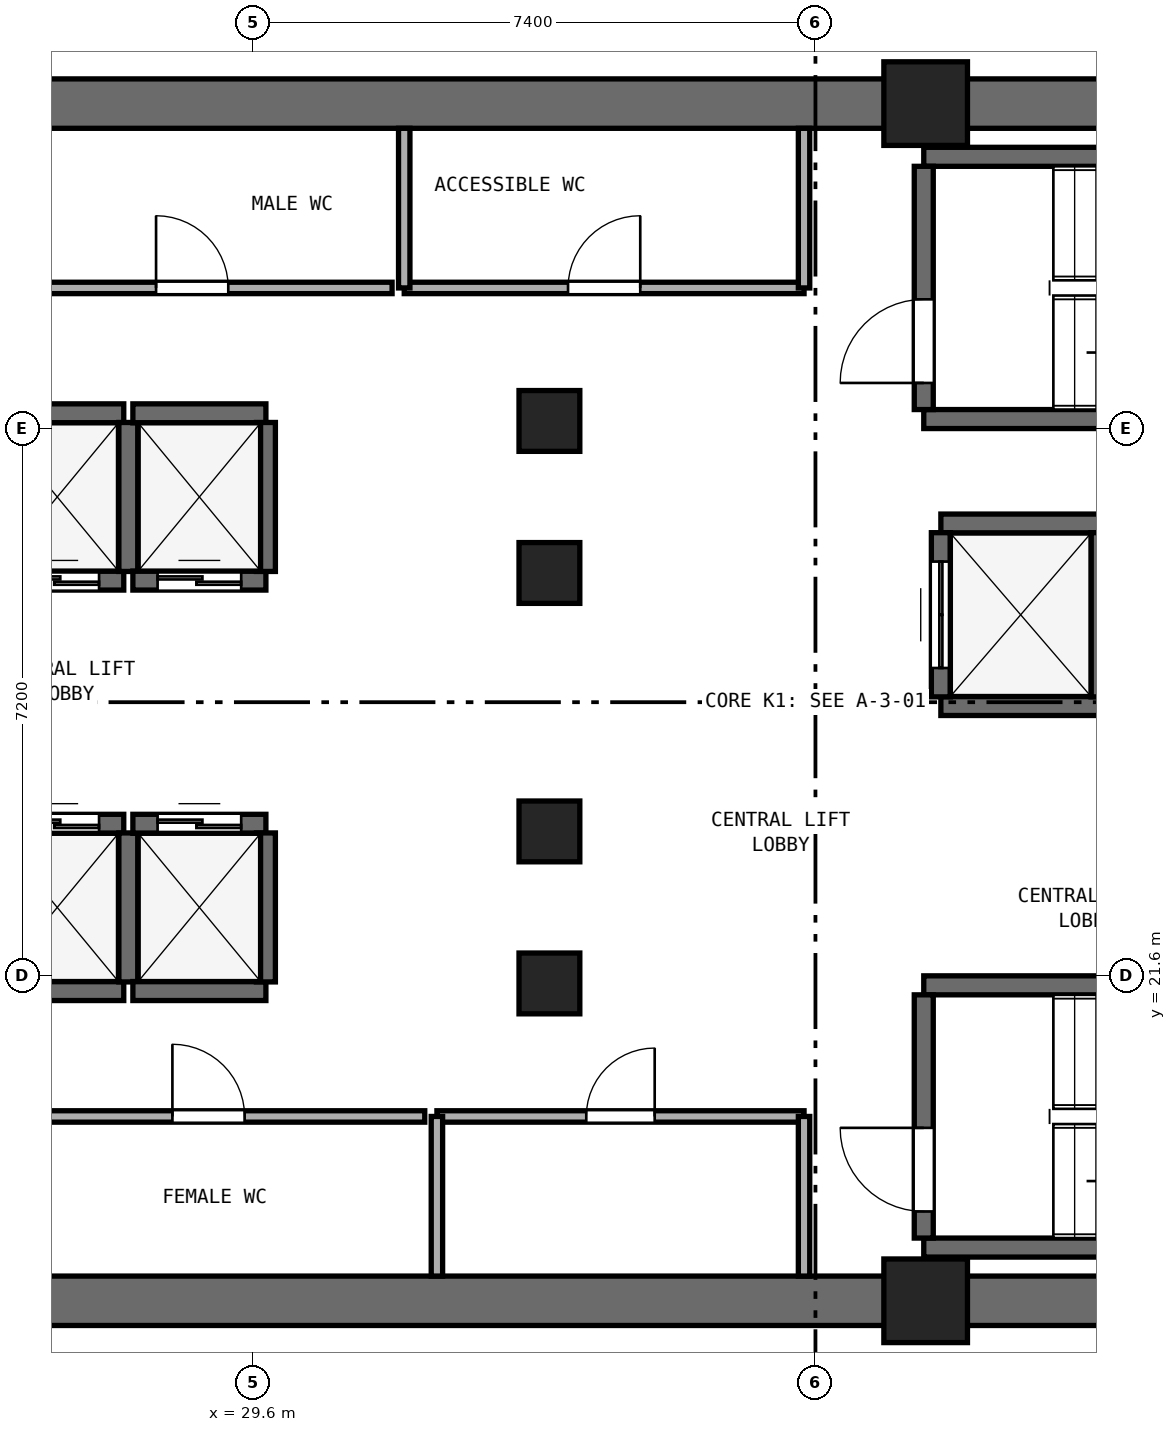
"""IFC4 building model, lengths in metres.
Left out: names, types, materials, properties, quantities, classifications, styles, units other than length and angle.
Written with IfcOpenShell. Run it as: python <this file> out.ifc"""

import sys

from ifc_helpers import new_model, si_unit, direction, frame, frame_2d, origin, origin_2d, place, context, subcontext, project, spatial, rectangle, extrude, element, fill, save


model = new_model("IFC4")
c1 = context("Model", 3, precision=1e-05, world=origin(), true_north=direction((0.0, 1.0)))
c2 = subcontext(c1, "Body", "Model", "MODEL_VIEW")
j1 = project(units=[si_unit("LENGTHUNIT", "METRE"), si_unit("PLANEANGLEUNIT", "RADIAN")], contexts=[c1])
p1 = place(None, origin())
s1 = spatial("IfcSite", under=j1, at=p1, CompositionType="ELEMENT")
p2 = place(p1, origin())
s2 = spatial("IfcBuilding", under=s1, at=p2, CompositionType="ELEMENT")
p3 = place(p2, frame((0.0, 0.0, -9.6)))
s3 = spatial("IfcBuildingStorey", under=s2, at=p3, CompositionType="ELEMENT", Elevation=-9.6)
for number, where, z_axis, x_axis in (
    (1, (25.4, 17.325, 0.0), (0.0, 0.0, 1.0), (1.0, 0.0, 0.0)),
    (2, (25.4, 33.075, 0.0), (0.0, 0.0, 1.0), (1.0, 0.0, 0.0)),
):
    element("IfcWall", number, at=place(p3, frame(where, z_axis=z_axis, x_axis=x_axis)), inside=s3, PredefinedType="SHEAR", context=c2, shape_type="SweptSolid", body=[
        extrude(rectangle(XDim=23.2, YDim=0.65, at=frame_2d((11.6, 0.0))), origin(), (0.0, 0.0, 1.0), 4.45),
    ])
for number, where, z_axis, x_axis in (
    (3, (38.45, 17.325, 0.0), (0.0, 0.0, 1.0), (1.0, 0.0, 0.0)),
    (4, (38.45, 33.075, 0.0), (0.0, 0.0, 1.0), (1.0, 0.0, 0.0)),
):
    element("IfcColumn", number, at=place(p3, frame(where, z_axis=z_axis, x_axis=x_axis)), inside=s3, PredefinedType="PILASTER", context=c2, shape_type="SweptSolid", body=[
        extrude(rectangle(XDim=1.1, YDim=1.1, at=origin_2d()), origin(), (0.0, 0.0, 1.0), 4.8),
    ])
for number, where, z_axis, x_axis in (
    (5, (33.5, 21.5, 0.0), (0.0, 0.0, 1.0), (1.0, 0.0, 0.0)),
    (6, (33.5, 23.5, 0.0), (0.0, 0.0, 1.0), (1.0, 0.0, 0.0)),
    (7, (33.5, 26.9, 0.0), (0.0, 0.0, 1.0), (1.0, 0.0, 0.0)),
    (8, (33.5, 28.9, 0.0), (0.0, 0.0, 1.0), (1.0, 0.0, 0.0)),
):
    element("IfcColumn", number, at=place(p3, frame(where, z_axis=z_axis, x_axis=x_axis)), inside=s3, PredefinedType="COLUMN", context=c2, shape_type="SweptSolid", body=[
        extrude(rectangle(XDim=0.8, YDim=0.8, at=origin_2d()), origin(), (0.0, 0.0, 1.0), 4.8),
    ])
for number, where, z_axis, x_axis in (
    (9, (38.425, 28.925, 0.0), (0.0, 0.0, 1.0), (1.0, 0.0, 0.0)),
    (10, (38.425, 32.375, 0.0), (0.0, 0.0, 1.0), (1.0, 0.0, 0.0)),
):
    element("IfcWall", number, at=place(p3, frame(where, z_axis=z_axis, x_axis=x_axis)), inside=s3, PredefinedType="SHEAR", context=c2, shape_type="SweptSolid", body=[
        extrude(rectangle(XDim=7.3, YDim=0.25, at=frame_2d((3.65, 0.0))), origin(), (0.0, 0.0, 1.0), 4.45),
    ])
p4 = place(p3, frame((38.425, 29.05, 0.0), z_axis=(0.0, 0.0, 1.0), x_axis=(0.0, 1.0, 0.0)))
e11 = element("IfcWall", 11, at=p4, inside=s3, PredefinedType="SHEAR", context=c2, shape_type="SweptSolid", body=[
    extrude(rectangle(XDim=3.2, YDim=0.25, at=frame_2d((1.6, 0.0))), origin(), (0.0, 0.0, 1.0), 4.45),
])
p5 = place(p4, frame((0.35, 0.0, 0.0)))
e12 = element("IfcOpeningElement", 12, at=p5, cuts=e11, PredefinedType="OPENING", context=c2, shape_type="SweptSolid", body=[
    extrude(rectangle(XDim=1.1, YDim=2.15, at=frame_2d((0.55, 1.075))), frame((0.0, 0.135, 0.0), z_axis=(0.0, -1.0, 0.0), x_axis=(1.0, 0.0, 0.0)), (0.0, 0.0, 1.0), 0.27),
])
for number, where, z_axis, x_axis in (
    (13, (38.425, 18.025, 0.0), (0.0, 0.0, 1.0), (1.0, 0.0, 0.0)),
    (14, (38.425, 21.475, 0.0), (0.0, 0.0, 1.0), (1.0, 0.0, 0.0)),
):
    element("IfcWall", number, at=place(p3, frame(where, z_axis=z_axis, x_axis=x_axis)), inside=s3, PredefinedType="SHEAR", context=c2, shape_type="SweptSolid", body=[
        extrude(rectangle(XDim=7.3, YDim=0.25, at=frame_2d((3.65, 0.0))), origin(), (0.0, 0.0, 1.0), 4.45),
    ])
p6 = place(p3, frame((38.425, 18.15, 0.0), z_axis=(0.0, 0.0, 1.0), x_axis=(0.0, 1.0, 0.0)))
e15 = element("IfcWall", 15, at=p6, inside=s3, PredefinedType="SHEAR", context=c2, shape_type="SweptSolid", body=[
    extrude(rectangle(XDim=3.2, YDim=0.25, at=frame_2d((1.6, 0.0))), origin(), (0.0, 0.0, 1.0), 4.45),
])
p7 = place(p6, frame((0.35, 0.0, 0.0)))
e16 = element("IfcOpeningElement", 16, at=p7, cuts=e15, PredefinedType="OPENING", context=c2, shape_type="SweptSolid", body=[
    extrude(rectangle(XDim=1.1, YDim=2.15, at=frame_2d((0.55, 1.075))), frame((0.0, 0.135, 0.0), z_axis=(0.0, -1.0, 0.0), x_axis=(1.0, 0.0, 0.0)), (0.0, 0.0, 1.0), 0.27),
])
p8 = place(p3, frame((26.15, 26.8, 0.0), z_axis=(0.0, 0.0, 1.0), x_axis=(1.0, 0.0, 0.0)))
e17 = element("IfcWall", 17, at=p8, inside=s3, PredefinedType="SHEAR", context=c2, shape_type="SweptSolid", body=[
    extrude(rectangle(XDim=1.75, YDim=0.25, at=frame_2d((0.875, 0.0))), origin(), (0.0, 0.0, 1.0), 4.45),
])
p9 = place(p8, frame((0.325, 0.0, 0.0)))
e18 = element("IfcOpeningElement", 18, at=p9, cuts=e17, PredefinedType="OPENING", context=c2, shape_type="SweptSolid", body=[
    extrude(rectangle(XDim=1.1, YDim=2.15, at=frame_2d((0.55, 1.075))), frame((0.0, 0.135, 0.0), z_axis=(0.0, -1.0, 0.0), x_axis=(1.0, 0.0, 0.0)), (0.0, 0.0, 1.0), 0.27),
])
p10 = place(p3, frame((26.15, 29.0, 0.0), z_axis=(0.0, 0.0, 1.0), x_axis=(1.0, 0.0, 0.0)))
e19 = element("IfcWall", 19, at=p10, inside=s3, PredefinedType="SHEAR", context=c2, shape_type="SweptSolid", body=[
    extrude(rectangle(XDim=1.75, YDim=0.25, at=frame_2d((0.875, 0.0))), origin(), (0.0, 0.0, 1.0), 4.45),
])
p11 = place(p3, frame((27.96, 26.92, 0.0), z_axis=(0.0, 0.0, 1.0), x_axis=(0.0, 1.0, 0.0)))
e20 = element("IfcWall", 20, at=p11, inside=s3, PredefinedType="SHEAR", context=c2, shape_type="SweptSolid", body=[
    extrude(rectangle(XDim=1.96, YDim=0.25, at=frame_2d((0.98, 0.0))), origin(), (0.0, 0.0, 1.0), 4.45),
])
p12 = place(p3, frame((28.02, 26.8, 0.0), z_axis=(0.0, 0.0, 1.0), x_axis=(1.0, 0.0, 0.0)))
e21 = element("IfcWall", 21, at=p12, inside=s3, PredefinedType="SHEAR", context=c2, shape_type="SweptSolid", body=[
    extrude(rectangle(XDim=1.75, YDim=0.25, at=frame_2d((0.875, 0.0))), origin(), (0.0, 0.0, 1.0), 4.45),
])
p13 = place(p12, frame((0.325, 0.0, 0.0)))
e22 = element("IfcOpeningElement", 22, at=p13, cuts=e21, PredefinedType="OPENING", context=c2, shape_type="SweptSolid", body=[
    extrude(rectangle(XDim=1.1, YDim=2.15, at=frame_2d((0.55, 1.075))), frame((0.0, 0.135, 0.0), z_axis=(0.0, -1.0, 0.0), x_axis=(1.0, 0.0, 0.0)), (0.0, 0.0, 1.0), 0.27),
])
p14 = place(p3, frame((28.02, 29.0, 0.0), z_axis=(0.0, 0.0, 1.0), x_axis=(1.0, 0.0, 0.0)))
e23 = element("IfcWall", 23, at=p14, inside=s3, PredefinedType="SHEAR", context=c2, shape_type="SweptSolid", body=[
    extrude(rectangle(XDim=1.75, YDim=0.25, at=frame_2d((0.875, 0.0))), origin(), (0.0, 0.0, 1.0), 4.45),
])
p15 = place(p3, frame((29.77, 26.92, 0.0), z_axis=(0.0, 0.0, 1.0), x_axis=(0.0, 1.0, 0.0)))
e24 = element("IfcWall", 24, at=p15, inside=s3, PredefinedType="SHEAR", context=c2, shape_type="SweptSolid", body=[
    extrude(rectangle(XDim=1.96, YDim=0.25, at=frame_2d((0.98, 0.0))), origin(), (0.0, 0.0, 1.0), 4.45),
])
p16 = place(p3, frame((26.15, 21.4, 0.0), z_axis=(0.0, 0.0, 1.0), x_axis=(1.0, 0.0, 0.0)))
e25 = element("IfcWall", 25, at=p16, inside=s3, PredefinedType="SHEAR", context=c2, shape_type="SweptSolid", body=[
    extrude(rectangle(XDim=1.75, YDim=0.25, at=frame_2d((0.875, 0.0))), origin(), (0.0, 0.0, 1.0), 4.45),
])
p17 = place(p3, frame((26.15, 23.6, 0.0), z_axis=(0.0, 0.0, 1.0), x_axis=(1.0, 0.0, 0.0)))
e26 = element("IfcWall", 26, at=p17, inside=s3, PredefinedType="SHEAR", context=c2, shape_type="SweptSolid", body=[
    extrude(rectangle(XDim=1.75, YDim=0.25, at=frame_2d((0.875, 0.0))), origin(), (0.0, 0.0, 1.0), 4.45),
])
p18 = place(p17, frame((0.325, 0.0, 0.0)))
e27 = element("IfcOpeningElement", 27, at=p18, cuts=e26, PredefinedType="OPENING", context=c2, shape_type="SweptSolid", body=[
    extrude(rectangle(XDim=1.1, YDim=2.15, at=frame_2d((0.55, 1.075))), frame((0.0, 0.135, 0.0), z_axis=(0.0, -1.0, 0.0), x_axis=(1.0, 0.0, 0.0)), (0.0, 0.0, 1.0), 0.27),
])
p19 = place(p3, frame((27.96, 21.52, 0.0), z_axis=(0.0, 0.0, 1.0), x_axis=(0.0, 1.0, 0.0)))
e28 = element("IfcWall", 28, at=p19, inside=s3, PredefinedType="SHEAR", context=c2, shape_type="SweptSolid", body=[
    extrude(rectangle(XDim=1.96, YDim=0.25, at=frame_2d((0.98, 0.0))), origin(), (0.0, 0.0, 1.0), 4.45),
])
p20 = place(p3, frame((28.02, 21.4, 0.0), z_axis=(0.0, 0.0, 1.0), x_axis=(1.0, 0.0, 0.0)))
e29 = element("IfcWall", 29, at=p20, inside=s3, PredefinedType="SHEAR", context=c2, shape_type="SweptSolid", body=[
    extrude(rectangle(XDim=1.75, YDim=0.25, at=frame_2d((0.875, 0.0))), origin(), (0.0, 0.0, 1.0), 4.45),
])
p21 = place(p3, frame((28.02, 23.6, 0.0), z_axis=(0.0, 0.0, 1.0), x_axis=(1.0, 0.0, 0.0)))
e30 = element("IfcWall", 30, at=p21, inside=s3, PredefinedType="SHEAR", context=c2, shape_type="SweptSolid", body=[
    extrude(rectangle(XDim=1.75, YDim=0.25, at=frame_2d((0.875, 0.0))), origin(), (0.0, 0.0, 1.0), 4.45),
])
p22 = place(p21, frame((0.325, 0.0, 0.0)))
e31 = element("IfcOpeningElement", 31, at=p22, cuts=e30, PredefinedType="OPENING", context=c2, shape_type="SweptSolid", body=[
    extrude(rectangle(XDim=1.1, YDim=2.15, at=frame_2d((0.55, 1.075))), frame((0.0, 0.135, 0.0), z_axis=(0.0, -1.0, 0.0), x_axis=(1.0, 0.0, 0.0)), (0.0, 0.0, 1.0), 0.27),
])
p23 = place(p3, frame((29.77, 21.52, 0.0), z_axis=(0.0, 0.0, 1.0), x_axis=(0.0, 1.0, 0.0)))
e32 = element("IfcWall", 32, at=p23, inside=s3, PredefinedType="SHEAR", context=c2, shape_type="SweptSolid", body=[
    extrude(rectangle(XDim=1.96, YDim=0.25, at=frame_2d((0.98, 0.0))), origin(), (0.0, 0.0, 1.0), 4.45),
])
for number, where, z_axis, x_axis in (
    (33, (38.65, 25.15, 0.0), (0.0, 0.0, 1.0), (1.0, 0.0, 0.0)),
    (34, (38.65, 27.55, 0.0), (0.0, 0.0, 1.0), (1.0, 0.0, 0.0)),
):
    element("IfcWall", number, at=place(p3, frame(where, z_axis=z_axis, x_axis=x_axis)), inside=s3, PredefinedType="SHEAR", context=c2, shape_type="SweptSolid", body=[
        extrude(rectangle(XDim=2.1, YDim=0.25, at=frame_2d((1.05, 0.0))), origin(), (0.0, 0.0, 1.0), 4.45),
    ])
p24 = place(p3, frame((38.65, 25.27, 0.0), z_axis=(0.0, 0.0, 1.0), x_axis=(0.0, 1.0, 0.0)))
e35 = element("IfcWall", 35, at=p24, inside=s3, PredefinedType="SHEAR", context=c2, shape_type="SweptSolid", body=[
    extrude(rectangle(XDim=2.16, YDim=0.25, at=frame_2d((1.08, 0.0))), origin(), (0.0, 0.0, 1.0), 4.45),
])
p25 = place(p24, frame((0.38, 0.0, 0.0)))
e36 = element("IfcOpeningElement", 36, at=p25, cuts=e35, PredefinedType="OPENING", context=c2, shape_type="SweptSolid", body=[
    extrude(rectangle(XDim=1.4, YDim=2.2, at=frame_2d((0.7, 1.1))), frame((0.0, 0.135, 0.0), z_axis=(0.0, -1.0, 0.0), x_axis=(1.0, 0.0, 0.0)), (0.0, 0.0, 1.0), 0.27),
])
p26 = place(p3, frame((40.75, 25.27, 0.0), z_axis=(0.0, 0.0, 1.0), x_axis=(0.0, 1.0, 0.0)))
e37 = element("IfcWall", 37, at=p26, inside=s3, PredefinedType="SHEAR", context=c2, shape_type="SweptSolid", body=[
    extrude(rectangle(XDim=2.16, YDim=0.25, at=frame_2d((1.08, 0.0))), origin(), (0.0, 0.0, 1.0), 4.45),
])
p27 = place(p3, frame((26.17, 30.65, 0.0), z_axis=(0.0, 0.0, 1.0), x_axis=(1.0, 0.0, 0.0)))
e38 = element("IfcWall", 38, at=p27, inside=s3, PredefinedType="PARTITIONING", context=c2, shape_type="SweptSolid", body=[
    extrude(rectangle(XDim=5.26, YDim=0.15, at=frame_2d((2.63, 0.0))), origin(), (0.0, 0.0, 1.0), 4.45),
])
p28 = place(p27, frame((2.155, 0.0, 0.0)))
e39 = element("IfcOpeningElement", 39, at=p28, cuts=e38, PredefinedType="OPENING", context=c2, shape_type="SweptSolid", body=[
    extrude(rectangle(XDim=0.95, YDim=2.1, at=frame_2d((0.475, 1.05))), frame((0.0, 0.085, 0.0), z_axis=(0.0, -1.0, 0.0), x_axis=(1.0, 0.0, 0.0)), (0.0, 0.0, 1.0), 0.17),
])
p29 = place(p3, frame((31.59, 30.65, 0.0), z_axis=(0.0, 0.0, 1.0), x_axis=(1.0, 0.0, 0.0)))
e40 = element("IfcWall", 40, at=p29, inside=s3, PredefinedType="PARTITIONING", context=c2, shape_type="SweptSolid", body=[
    extrude(rectangle(XDim=5.26, YDim=0.15, at=frame_2d((2.63, 0.0))), origin(), (0.0, 0.0, 1.0), 4.45),
])
p30 = place(p29, frame((2.155, 0.0, 0.0)))
e41 = element("IfcOpeningElement", 41, at=p30, cuts=e40, PredefinedType="OPENING", context=c2, shape_type="SweptSolid", body=[
    extrude(rectangle(XDim=0.95, YDim=2.1, at=frame_2d((0.475, 1.05))), frame((0.0, 0.085, 0.0), z_axis=(0.0, -1.0, 0.0), x_axis=(1.0, 0.0, 0.0)), (0.0, 0.0, 1.0), 0.17),
])
for number, where, z_axis, x_axis in (
    (42, (31.59, 30.65, 0.0), (0.0, 0.0, 1.0), (0.0, 1.0, 0.0)),
    (43, (36.85, 30.65, 0.0), (0.0, 0.0, 1.0), (0.0, 1.0, 0.0)),
):
    element("IfcWall", number, at=place(p3, frame(where, z_axis=z_axis, x_axis=x_axis)), inside=s3, PredefinedType="PARTITIONING", context=c2, shape_type="SweptSolid", body=[
        extrude(rectangle(XDim=2.1, YDim=0.15, at=frame_2d((1.05, 0.0))), origin(), (0.0, 0.0, 1.0), 4.45),
    ])
p31 = place(p3, frame((26.17, 19.75, 0.0), z_axis=(0.0, 0.0, 1.0), x_axis=(1.0, 0.0, 0.0)))
e44 = element("IfcWall", 44, at=p31, inside=s3, PredefinedType="PARTITIONING", context=c2, shape_type="SweptSolid", body=[
    extrude(rectangle(XDim=5.69, YDim=0.15, at=frame_2d((2.845, 0.0))), origin(), (0.0, 0.0, 1.0), 4.45),
])
p32 = place(p31, frame((2.37, 0.0, 0.0)))
e45 = element("IfcOpeningElement", 45, at=p32, cuts=e44, PredefinedType="OPENING", context=c2, shape_type="SweptSolid", body=[
    extrude(rectangle(XDim=0.95, YDim=2.1, at=frame_2d((0.475, 1.05))), frame((0.0, 0.085, 0.0), z_axis=(0.0, -1.0, 0.0), x_axis=(1.0, 0.0, 0.0)), (0.0, 0.0, 1.0), 0.17),
])
p33 = place(p3, frame((32.02, 19.75, 0.0), z_axis=(0.0, 0.0, 1.0), x_axis=(1.0, 0.0, 0.0)))
e46 = element("IfcWall", 46, at=p33, inside=s3, PredefinedType="PARTITIONING", context=c2, shape_type="SweptSolid", body=[
    extrude(rectangle(XDim=4.83, YDim=0.15, at=frame_2d((2.415, 0.0))), origin(), (0.0, 0.0, 1.0), 4.45),
])
p34 = place(p33, frame((1.965, 0.0, 0.0)))
e47 = element("IfcOpeningElement", 47, at=p34, cuts=e46, PredefinedType="OPENING", context=c2, shape_type="SweptSolid", body=[
    extrude(rectangle(XDim=0.9, YDim=2.1, at=frame_2d((0.45, 1.05))), frame((0.0, 0.085, 0.0), z_axis=(0.0, -1.0, 0.0), x_axis=(1.0, 0.0, 0.0)), (0.0, 0.0, 1.0), 0.17),
])
for number, where, z_axis, x_axis in (
    (48, (32.02, 17.65, 0.0), (0.0, 0.0, 1.0), (0.0, 1.0, 0.0)),
    (49, (36.85, 17.65, 0.0), (0.0, 0.0, 1.0), (0.0, 1.0, 0.0)),
):
    element("IfcWall", number, at=place(p3, frame(where, z_axis=z_axis, x_axis=x_axis)), inside=s3, PredefinedType="PARTITIONING", context=c2, shape_type="SweptSolid", body=[
        extrude(rectangle(XDim=2.1, YDim=0.15, at=frame_2d((1.05, 0.0))), origin(), (0.0, 0.0, 1.0), 4.45),
    ])
p35 = place(p5, origin())
e50 = element("IfcDoor", 50, at=p35, inside=s3, OperationType="SINGLE_SWING_LEFT", PredefinedType="DOOR", context=c2, shape_type="SweptSolid", body=[
    extrude(rectangle(XDim=1.1, YDim=2.15, at=frame_2d((0.55, 1.075))), frame((0.0, 0.025, 0.0), z_axis=(0.0, -1.0, 0.0), x_axis=(1.0, 0.0, 0.0)), (0.0, 0.0, 1.0), 0.05),
])
fill(e12, e50)
p36 = place(p7, origin())
e51 = element("IfcDoor", 51, at=p36, inside=s3, OperationType="SINGLE_SWING_RIGHT", PredefinedType="DOOR", context=c2, shape_type="SweptSolid", body=[
    extrude(rectangle(XDim=1.1, YDim=2.15, at=frame_2d((0.55, 1.075))), frame((0.0, 0.025, 0.0), z_axis=(0.0, -1.0, 0.0), x_axis=(1.0, 0.0, 0.0)), (0.0, 0.0, 1.0), 0.05),
])
fill(e16, e51)
p37 = place(p9, origin())
e52 = element("IfcDoor", 52, at=p37, inside=s3, OperationType="DOUBLE_DOOR_SLIDING", PredefinedType="DOOR", context=c2, shape_type="SweptSolid", body=[
    extrude(rectangle(XDim=1.1, YDim=2.15, at=frame_2d((0.55, 1.075))), frame((0.0, 0.025, 0.0), z_axis=(0.0, -1.0, 0.0), x_axis=(1.0, 0.0, 0.0)), (0.0, 0.0, 1.0), 0.05),
])
fill(e18, e52)
p38 = place(p13, origin())
e53 = element("IfcDoor", 53, at=p38, inside=s3, OperationType="DOUBLE_DOOR_SLIDING", PredefinedType="DOOR", context=c2, shape_type="SweptSolid", body=[
    extrude(rectangle(XDim=1.1, YDim=2.15, at=frame_2d((0.55, 1.075))), frame((0.0, 0.025, 0.0), z_axis=(0.0, -1.0, 0.0), x_axis=(1.0, 0.0, 0.0)), (0.0, 0.0, 1.0), 0.05),
])
fill(e22, e53)
p39 = place(p18, origin())
e54 = element("IfcDoor", 54, at=p39, inside=s3, OperationType="DOUBLE_DOOR_SLIDING", PredefinedType="DOOR", context=c2, shape_type="SweptSolid", body=[
    extrude(rectangle(XDim=1.1, YDim=2.15, at=frame_2d((0.55, 1.075))), frame((0.0, 0.025, 0.0), z_axis=(0.0, -1.0, 0.0), x_axis=(1.0, 0.0, 0.0)), (0.0, 0.0, 1.0), 0.05),
])
fill(e27, e54)
p40 = place(p22, origin())
e55 = element("IfcDoor", 55, at=p40, inside=s3, OperationType="DOUBLE_DOOR_SLIDING", PredefinedType="DOOR", context=c2, shape_type="SweptSolid", body=[
    extrude(rectangle(XDim=1.1, YDim=2.15, at=frame_2d((0.55, 1.075))), frame((0.0, 0.025, 0.0), z_axis=(0.0, -1.0, 0.0), x_axis=(1.0, 0.0, 0.0)), (0.0, 0.0, 1.0), 0.05),
])
fill(e31, e55)
p41 = place(p25, origin())
e56 = element("IfcDoor", 56, at=p41, inside=s3, OperationType="DOUBLE_DOOR_SLIDING", PredefinedType="DOOR", context=c2, shape_type="SweptSolid", body=[
    extrude(rectangle(XDim=1.4, YDim=2.2, at=frame_2d((0.7, 1.1))), frame((0.0, 0.025, 0.0), z_axis=(0.0, -1.0, 0.0), x_axis=(1.0, 0.0, 0.0)), (0.0, 0.0, 1.0), 0.05),
])
fill(e36, e56)
p42 = place(p28, origin())
e57 = element("IfcDoor", 57, at=p42, inside=s3, OperationType="SINGLE_SWING_LEFT", PredefinedType="DOOR", context=c2, shape_type="SweptSolid", body=[
    extrude(rectangle(XDim=0.95, YDim=2.1, at=frame_2d((0.475, 1.05))), frame((0.0, 0.025, 0.0), z_axis=(0.0, -1.0, 0.0), x_axis=(1.0, 0.0, 0.0)), (0.0, 0.0, 1.0), 0.05),
])
fill(e39, e57)
p43 = place(p30, origin())
e58 = element("IfcDoor", 58, at=p43, inside=s3, OperationType="SINGLE_SWING_RIGHT", PredefinedType="DOOR", context=c2, shape_type="SweptSolid", body=[
    extrude(rectangle(XDim=0.95, YDim=2.1, at=frame_2d((0.475, 1.05))), frame((0.0, 0.025, 0.0), z_axis=(0.0, -1.0, 0.0), x_axis=(1.0, 0.0, 0.0)), (0.0, 0.0, 1.0), 0.05),
])
fill(e41, e58)
p44 = place(p32, origin())
e59 = element("IfcDoor", 59, at=p44, inside=s3, OperationType="SINGLE_SWING_LEFT", PredefinedType="DOOR", context=c2, shape_type="SweptSolid", body=[
    extrude(rectangle(XDim=0.95, YDim=2.1, at=frame_2d((0.475, 1.05))), frame((0.0, 0.025, 0.0), z_axis=(0.0, -1.0, 0.0), x_axis=(1.0, 0.0, 0.0)), (0.0, 0.0, 1.0), 0.05),
])
fill(e45, e59)
p45 = place(p34, origin())
e60 = element("IfcDoor", 60, at=p45, inside=s3, OperationType="SINGLE_SWING_RIGHT", PredefinedType="DOOR", context=c2, shape_type="SweptSolid", body=[
    extrude(rectangle(XDim=0.9, YDim=2.1, at=frame_2d((0.45, 1.05))), frame((0.0, 0.025, 0.0), z_axis=(0.0, -1.0, 0.0), x_axis=(1.0, 0.0, 0.0)), (0.0, 0.0, 1.0), 0.05),
])
fill(e47, e60)
save(model, sys.argv[1])
